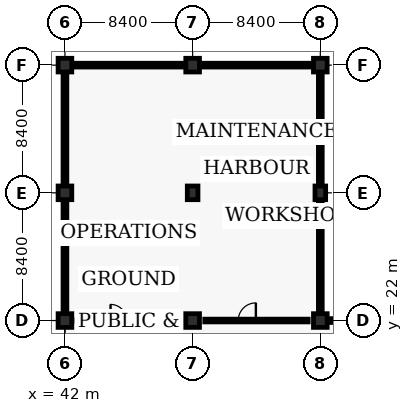
"""IFC4 building model, lengths in metres.
Left out: names, types, materials, properties, quantities, classifications, styles, units other than length and angle.
Written with IfcOpenShell. Run it as: python <this file> out.ifc"""

import sys

from ifc_helpers import new_model, si_unit, direction, frame, frame_2d, origin, origin_2d, place, context, subcontext, project, spatial, rectangle, extrude, element, fill, save


model = new_model("IFC4")
c1 = context("Model", 3, precision=1e-05, world=origin(), true_north=direction((0.0, 1.0)))
c2 = subcontext(c1, "Body", "Model", "MODEL_VIEW")
j1 = project(units=[si_unit("LENGTHUNIT", "METRE"), si_unit("PLANEANGLEUNIT", "RADIAN")], contexts=[c1])
p1 = place(None, origin())
s1 = spatial("IfcSite", under=j1, at=p1, CompositionType="ELEMENT")
p2 = place(p1, origin())
s2 = spatial("IfcBuilding", under=s1, at=p2, CompositionType="ELEMENT")
p3 = place(p2, origin())
s3 = spatial("IfcBuildingStorey", under=s2, at=p3, CompositionType="ELEMENT", Elevation=0.0)
for number, where, z_axis, x_axis in (
    (1, (42.0, 22.0, -0.46), (0.0, 0.0, 1.0), (1.0, 0.0, 0.0)),
    (2, (50.4, 22.0, -0.46), (0.0, 0.0, 1.0), (1.0, 0.0, 0.0)),
    (3, (58.8, 22.0, -0.46), (0.0, 0.0, 1.0), (1.0, 0.0, 0.0)),
    (4, (42.0, 30.4, -0.46), (0.0, 0.0, 1.0), (1.0, 0.0, 0.0)),
    (5, (42.0, 38.8, -0.46), (0.0, 0.0, 1.0), (1.0, 0.0, 0.0)),
):
    element("IfcColumn", number, at=place(p3, frame(where, z_axis=z_axis, x_axis=x_axis)), inside=s3, PredefinedType="COLUMN", context=c2, shape_type="SweptSolid", body=[
        extrude(rectangle(XDim=0.9, YDim=0.9, at=origin_2d()), origin(), (0.0, 0.0, 1.0), 5.9),
    ])
p4 = place(p3, frame((50.4, 30.4, -0.46), z_axis=(0.0, 0.0, 1.0), x_axis=(1.0, 0.0, 0.0)))
e6 = element("IfcColumn", 6, at=p4, inside=s3, PredefinedType="COLUMN", context=c2, shape_type="SweptSolid", body=[
    extrude(rectangle(XDim=0.7, YDim=0.9, at=origin_2d()), origin(), (0.0, 0.0, 1.0), 5.9),
])
p5 = place(p3, frame((50.4, 38.8, -0.46), z_axis=(0.0, 0.0, 1.0), x_axis=(1.0, 0.0, 0.0)))
e7 = element("IfcColumn", 7, at=p5, inside=s3, PredefinedType="COLUMN", context=c2, shape_type="SweptSolid", body=[
    extrude(rectangle(XDim=0.9, YDim=0.9, at=origin_2d()), origin(), (0.0, 0.0, 1.0), 5.9),
])
p6 = place(p3, frame((58.8, 30.4, -0.46), z_axis=(0.0, 0.0, 1.0), x_axis=(1.0, 0.0, 0.0)))
e8 = element("IfcColumn", 8, at=p6, inside=s3, PredefinedType="COLUMN", context=c2, shape_type="SweptSolid", body=[
    extrude(rectangle(XDim=0.7, YDim=0.9, at=origin_2d()), origin(), (0.0, 0.0, 1.0), 5.9),
])
p7 = place(p3, frame((58.8, 38.8, -0.46), z_axis=(0.0, 0.0, 1.0), x_axis=(1.0, 0.0, 0.0)))
e9 = element("IfcColumn", 9, at=p7, inside=s3, PredefinedType="COLUMN", context=c2, shape_type="SweptSolid", body=[
    extrude(rectangle(XDim=0.9, YDim=0.9, at=origin_2d()), origin(), (0.0, 0.0, 1.0), 5.9),
])
p8 = place(p3, frame((66.75, 22.0, 0.0), z_axis=(0.0, 0.0, 1.0), x_axis=(-1.0, 0.0, 0.0)))
e10 = element("IfcWall", 10, at=p8, inside=s3, PredefinedType="SOLIDWALL", context=c2, shape_type="SweptSolid", body=[
    extrude(rectangle(XDim=7.5, YDim=0.25, at=frame_2d((3.75, 0.0))), origin(), (0.0, 0.0, 1.0), 4.625),
])
p9 = place(p8, frame((1.74, 0.0, 0.0)))
e11 = element("IfcOpeningElement", 11, at=p9, cuts=e10, PredefinedType="OPENING", context=c2, shape_type="SweptSolid", body=[
    extrude(rectangle(XDim=1.12, YDim=2.15, at=frame_2d((0.56, 1.075))), frame((0.0, 0.135, 0.0), z_axis=(0.0, -1.0, 0.0), x_axis=(1.0, 0.0, 0.0)), (0.0, 0.0, 1.0), 0.27),
])
p10 = place(p8, frame((3.69, 0.0, 1.0)))
e12 = element("IfcOpeningElement", 12, at=p10, cuts=e10, PredefinedType="OPENING", context=c2, shape_type="SweptSolid", body=[
    extrude(rectangle(XDim=2.4, YDim=1.5, at=frame_2d((1.2, 0.75))), frame((0.0, 0.135, 0.0), z_axis=(0.0, -1.0, 0.0), x_axis=(1.0, 0.0, 0.0)), (0.0, 0.0, 1.0), 0.27),
])
p11 = place(p3, frame((42.0, 29.95, 0.0), z_axis=(0.0, 0.0, 1.0), x_axis=(0.0, -1.0, 0.0)))
e13 = element("IfcWall", 13, at=p11, inside=s3, PredefinedType="SOLIDWALL", context=c2, shape_type="SweptSolid", body=[
    extrude(rectangle(XDim=7.5, YDim=0.25, at=frame_2d((3.75, 0.0))), origin(), (0.0, 0.0, 1.0), 4.625),
])
p12 = place(p11, frame((1.59, 0.0, 0.95)))
e14 = element("IfcOpeningElement", 14, at=p12, cuts=e13, PredefinedType="OPENING", context=c2, shape_type="SweptSolid", body=[
    extrude(rectangle(XDim=1.6, YDim=1.35, at=frame_2d((0.8, 0.675))), frame((0.0, 0.135, 0.0), z_axis=(0.0, -1.0, 0.0), x_axis=(1.0, 0.0, 0.0)), (0.0, 0.0, 1.0), 0.27),
])
p13 = place(p11, frame((4.29, 0.0, 0.95)))
e15 = element("IfcOpeningElement", 15, at=p13, cuts=e13, PredefinedType="OPENING", context=c2, shape_type="SweptSolid", body=[
    extrude(rectangle(XDim=1.3, YDim=1.35, at=frame_2d((0.65, 0.675))), frame((0.0, 0.135, 0.0), z_axis=(0.0, -1.0, 0.0), x_axis=(1.0, 0.0, 0.0)), (0.0, 0.0, 1.0), 0.27),
])
p14 = place(p3, frame((58.8, 22.45, 0.0), z_axis=(0.0, 0.0, 1.0), x_axis=(0.0, 1.0, 0.0)))
e16 = element("IfcWall", 16, at=p14, inside=s3, PredefinedType="SOLIDWALL", context=c2, shape_type="SweptSolid", body=[
    extrude(rectangle(XDim=7.5, YDim=0.25, at=frame_2d((3.75, 0.0))), origin(), (0.0, 0.0, 1.0), 4.625),
])
p15 = place(p14, frame((1.59, 0.0, 0.95)))
e17 = element("IfcOpeningElement", 17, at=p15, cuts=e16, PredefinedType="OPENING", context=c2, shape_type="SweptSolid", body=[
    extrude(rectangle(XDim=1.6, YDim=1.35, at=frame_2d((0.8, 0.675))), frame((0.0, 0.135, 0.0), z_axis=(0.0, -1.0, 0.0), x_axis=(1.0, 0.0, 0.0)), (0.0, 0.0, 1.0), 0.27),
])
p16 = place(p14, frame((4.29, 0.0, 0.95)))
e18 = element("IfcOpeningElement", 18, at=p16, cuts=e16, PredefinedType="OPENING", context=c2, shape_type="SweptSolid", body=[
    extrude(rectangle(XDim=1.3, YDim=1.35, at=frame_2d((0.65, 0.675))), frame((0.0, 0.135, 0.0), z_axis=(0.0, -1.0, 0.0), x_axis=(1.0, 0.0, 0.0)), (0.0, 0.0, 1.0), 0.27),
])
p17 = place(p3, frame((42.0, 38.35, 0.0), z_axis=(0.0, 0.0, 1.0), x_axis=(0.0, -1.0, 0.0)))
e19 = element("IfcWall", 19, at=p17, inside=s3, PredefinedType="SOLIDWALL", context=c2, shape_type="SweptSolid", body=[
    extrude(rectangle(XDim=7.5, YDim=0.25, at=frame_2d((3.75, 0.0))), origin(), (0.0, 0.0, 1.0), 4.625),
])
p18 = place(p17, frame((1.59, 0.0, 0.95)))
e20 = element("IfcOpeningElement", 20, at=p18, cuts=e19, PredefinedType="OPENING", context=c2, shape_type="SweptSolid", body=[
    extrude(rectangle(XDim=1.6, YDim=1.35, at=frame_2d((0.8, 0.675))), frame((0.0, 0.135, 0.0), z_axis=(0.0, -1.0, 0.0), x_axis=(1.0, 0.0, 0.0)), (0.0, 0.0, 1.0), 0.27),
])
p19 = place(p17, frame((4.29, 0.0, 0.95)))
e21 = element("IfcOpeningElement", 21, at=p19, cuts=e19, PredefinedType="OPENING", context=c2, shape_type="SweptSolid", body=[
    extrude(rectangle(XDim=1.3, YDim=1.35, at=frame_2d((0.65, 0.675))), frame((0.0, 0.135, 0.0), z_axis=(0.0, -1.0, 0.0), x_axis=(1.0, 0.0, 0.0)), (0.0, 0.0, 1.0), 0.27),
])
p20 = place(p3, frame((58.8, 30.85, 0.0), z_axis=(0.0, 0.0, 1.0), x_axis=(0.0, 1.0, 0.0)))
e22 = element("IfcWall", 22, at=p20, inside=s3, PredefinedType="SOLIDWALL", context=c2, shape_type="SweptSolid", body=[
    extrude(rectangle(XDim=7.5, YDim=0.25, at=frame_2d((3.75, 0.0))), origin(), (0.0, 0.0, 1.0), 4.625),
])
p21 = place(p20, frame((1.59, 0.0, 0.95)))
e23 = element("IfcOpeningElement", 23, at=p21, cuts=e22, PredefinedType="OPENING", context=c2, shape_type="SweptSolid", body=[
    extrude(rectangle(XDim=1.6, YDim=1.35, at=frame_2d((0.8, 0.675))), frame((0.0, 0.135, 0.0), z_axis=(0.0, -1.0, 0.0), x_axis=(1.0, 0.0, 0.0)), (0.0, 0.0, 1.0), 0.27),
])
p22 = place(p20, frame((4.29, 0.0, 0.95)))
e24 = element("IfcOpeningElement", 24, at=p22, cuts=e22, PredefinedType="OPENING", context=c2, shape_type="SweptSolid", body=[
    extrude(rectangle(XDim=1.3, YDim=1.35, at=frame_2d((0.65, 0.675))), frame((0.0, 0.135, 0.0), z_axis=(0.0, -1.0, 0.0), x_axis=(1.0, 0.0, 0.0)), (0.0, 0.0, 1.0), 0.27),
])
p23 = place(p3, frame((49.95, 38.8, 0.0), z_axis=(0.0, 0.0, 1.0), x_axis=(-1.0, 0.0, 0.0)))
e25 = element("IfcWall", 25, at=p23, inside=s3, PredefinedType="SOLIDWALL", context=c2, shape_type="SweptSolid", body=[
    extrude(rectangle(XDim=7.5, YDim=0.25, at=frame_2d((3.75, 0.0))), origin(), (0.0, 0.0, 1.0), 4.625),
])
p24 = place(p23, frame((1.44, 0.0, 0.95)))
e26 = element("IfcOpeningElement", 26, at=p24, cuts=e25, PredefinedType="OPENING", context=c2, shape_type="SweptSolid", body=[
    extrude(rectangle(XDim=2.4, YDim=1.5, at=frame_2d((1.2, 0.75))), frame((0.0, 0.135, 0.0), z_axis=(0.0, -1.0, 0.0), x_axis=(1.0, 0.0, 0.0)), (0.0, 0.0, 1.0), 0.27),
])
p25 = place(p23, frame((4.24, 0.0, 1.35)))
e27 = element("IfcOpeningElement", 27, at=p25, cuts=e25, PredefinedType="OPENING", context=c2, shape_type="SweptSolid", body=[
    extrude(rectangle(XDim=2.8, YDim=1.05, at=frame_2d((1.4, 0.525))), frame((0.0, 0.135, 0.0), z_axis=(0.0, -1.0, 0.0), x_axis=(1.0, 0.0, 0.0)), (0.0, 0.0, 1.0), 0.27),
])
p26 = place(p3, frame((58.35, 38.8, 0.0), z_axis=(0.0, 0.0, 1.0), x_axis=(-1.0, 0.0, 0.0)))
e28 = element("IfcWall", 28, at=p26, inside=s3, PredefinedType="SOLIDWALL", context=c2, shape_type="SweptSolid", body=[
    extrude(rectangle(XDim=7.5, YDim=0.25, at=frame_2d((3.75, 0.0))), origin(), (0.0, 0.0, 1.0), 4.745),
])
p27 = place(p26, frame((1.44, 0.0, 0.95)))
e29 = element("IfcOpeningElement", 29, at=p27, cuts=e28, PredefinedType="OPENING", context=c2, shape_type="SweptSolid", body=[
    extrude(rectangle(XDim=2.4, YDim=1.5, at=frame_2d((1.2, 0.75))), frame((0.0, 0.135, 0.0), z_axis=(0.0, -1.0, 0.0), x_axis=(1.0, 0.0, 0.0)), (0.0, 0.0, 1.0), 0.27),
])
p28 = place(p26, frame((4.24, 0.0, 1.35)))
e30 = element("IfcOpeningElement", 30, at=p28, cuts=e28, PredefinedType="OPENING", context=c2, shape_type="SweptSolid", body=[
    extrude(rectangle(XDim=2.8, YDim=1.05, at=frame_2d((1.4, 0.525))), frame((0.0, 0.135, 0.0), z_axis=(0.0, -1.0, 0.0), x_axis=(1.0, 0.0, 0.0)), (0.0, 0.0, 1.0), 0.27),
])
p29 = place(p3, frame((42.8, 22.0, 0.0), z_axis=(0.0, 0.0, 1.0), x_axis=(1.0, 0.0, 0.0)))
e31 = element("IfcWall", 31, at=p29, inside=s3, PredefinedType="PARTITIONING", context=c2, shape_type="SweptSolid", body=[
    extrude(rectangle(XDim=6.8, YDim=0.1, at=frame_2d((3.4, 0.0))), origin(), (0.0, 0.0, 1.0), 2.55),
])
p30 = place(p29, frame((2.2, 0.0, 0.0)))
e32 = element("IfcOpeningElement", 32, at=p30, cuts=e31, PredefinedType="OPENING", context=c2, shape_type="SweptSolid", body=[
    extrude(rectangle(XDim=1.06, YDim=2.1, at=frame_2d((0.53, 1.05))), frame((0.0, 0.06, 0.0), z_axis=(0.0, -1.0, 0.0), x_axis=(1.0, 0.0, 0.0)), (0.0, 0.0, 1.0), 0.12),
])
p31 = place(p3, frame((51.2, 22.0, 0.0), z_axis=(0.0, 0.0, 1.0), x_axis=(1.0, 0.0, 0.0)))
e33 = element("IfcWall", 33, at=p31, inside=s3, PredefinedType="SOLIDWALL", context=c2, shape_type="SweptSolid", body=[
    extrude(rectangle(XDim=6.8, YDim=0.18, at=frame_2d((3.4, 0.0))), origin(), (0.0, 0.0, 1.0), 2.55),
])
p32 = place(p31, frame((2.2, 0.0, 0.0)))
e34 = element("IfcOpeningElement", 34, at=p32, cuts=e33, PredefinedType="OPENING", context=c2, shape_type="SweptSolid", body=[
    extrude(rectangle(XDim=1.16, YDim=2.14, at=frame_2d((0.58, 1.07))), frame((0.0, 0.1, 0.0), z_axis=(0.0, -1.0, 0.0), x_axis=(1.0, 0.0, 0.0)), (0.0, 0.0, 1.0), 0.2),
])
p33 = place(p12, origin())
e35 = element("IfcWindow", 35, at=p33, inside=s3, PartitioningType="DOUBLE_PANEL_VERTICAL", PredefinedType="WINDOW", context=c2, shape_type="SweptSolid", body=[
    extrude(rectangle(XDim=1.6, YDim=1.35, at=frame_2d((0.8, 0.675))), frame((0.0, 0.03, 0.0), z_axis=(0.0, -1.0, 0.0), x_axis=(1.0, 0.0, 0.0)), (0.0, 0.0, 1.0), 0.06),
])
fill(e14, e35)
p34 = place(p13, origin())
e36 = element("IfcWindow", 36, at=p34, inside=s3, PartitioningType="SINGLE_PANEL", PredefinedType="WINDOW", context=c2, shape_type="SweptSolid", body=[
    extrude(rectangle(XDim=1.3, YDim=1.35, at=frame_2d((0.65, 0.675))), frame((0.0, 0.03, 0.0), z_axis=(0.0, -1.0, 0.0), x_axis=(1.0, 0.0, 0.0)), (0.0, 0.0, 1.0), 0.06),
])
fill(e15, e36)
p35 = place(p15, origin())
e37 = element("IfcWindow", 37, at=p35, inside=s3, PartitioningType="DOUBLE_PANEL_VERTICAL", PredefinedType="WINDOW", context=c2, shape_type="SweptSolid", body=[
    extrude(rectangle(XDim=1.6, YDim=1.35, at=frame_2d((0.8, 0.675))), frame((0.0, 0.03, 0.0), z_axis=(0.0, -1.0, 0.0), x_axis=(1.0, 0.0, 0.0)), (0.0, 0.0, 1.0), 0.06),
])
fill(e17, e37)
p36 = place(p16, origin())
e38 = element("IfcWindow", 38, at=p36, inside=s3, PartitioningType="SINGLE_PANEL", PredefinedType="WINDOW", context=c2, shape_type="SweptSolid", body=[
    extrude(rectangle(XDim=1.3, YDim=1.35, at=frame_2d((0.65, 0.675))), frame((0.0, 0.03, 0.0), z_axis=(0.0, -1.0, 0.0), x_axis=(1.0, 0.0, 0.0)), (0.0, 0.0, 1.0), 0.06),
])
fill(e18, e38)
p37 = place(p18, origin())
e39 = element("IfcWindow", 39, at=p37, inside=s3, PartitioningType="DOUBLE_PANEL_VERTICAL", PredefinedType="WINDOW", context=c2, shape_type="SweptSolid", body=[
    extrude(rectangle(XDim=1.6, YDim=1.35, at=frame_2d((0.8, 0.675))), frame((0.0, 0.03, 0.0), z_axis=(0.0, -1.0, 0.0), x_axis=(1.0, 0.0, 0.0)), (0.0, 0.0, 1.0), 0.06),
])
fill(e20, e39)
p38 = place(p19, origin())
e40 = element("IfcWindow", 40, at=p38, inside=s3, PartitioningType="SINGLE_PANEL", PredefinedType="WINDOW", context=c2, shape_type="SweptSolid", body=[
    extrude(rectangle(XDim=1.3, YDim=1.35, at=frame_2d((0.65, 0.675))), frame((0.0, 0.03, 0.0), z_axis=(0.0, -1.0, 0.0), x_axis=(1.0, 0.0, 0.0)), (0.0, 0.0, 1.0), 0.06),
])
fill(e21, e40)
p39 = place(p21, origin())
e41 = element("IfcWindow", 41, at=p39, inside=s3, PartitioningType="DOUBLE_PANEL_VERTICAL", PredefinedType="WINDOW", context=c2, shape_type="SweptSolid", body=[
    extrude(rectangle(XDim=1.6, YDim=1.35, at=frame_2d((0.8, 0.675))), frame((0.0, 0.03, 0.0), z_axis=(0.0, -1.0, 0.0), x_axis=(1.0, 0.0, 0.0)), (0.0, 0.0, 1.0), 0.06),
])
fill(e23, e41)
p40 = place(p22, origin())
e42 = element("IfcWindow", 42, at=p40, inside=s3, PartitioningType="SINGLE_PANEL", PredefinedType="WINDOW", context=c2, shape_type="SweptSolid", body=[
    extrude(rectangle(XDim=1.3, YDim=1.35, at=frame_2d((0.65, 0.675))), frame((0.0, 0.03, 0.0), z_axis=(0.0, -1.0, 0.0), x_axis=(1.0, 0.0, 0.0)), (0.0, 0.0, 1.0), 0.06),
])
fill(e24, e42)
p41 = place(p24, origin())
e43 = element("IfcWindow", 43, at=p41, inside=s3, PartitioningType="TRIPLE_PANEL_VERTICAL", PredefinedType="WINDOW", context=c2, shape_type="SweptSolid", body=[
    extrude(rectangle(XDim=2.4, YDim=1.5, at=frame_2d((1.2, 0.75))), frame((0.0, 0.03, 0.0), z_axis=(0.0, -1.0, 0.0), x_axis=(1.0, 0.0, 0.0)), (0.0, 0.0, 1.0), 0.06),
])
fill(e26, e43)
p42 = place(p25, origin())
e44 = element("IfcWindow", 44, at=p42, inside=s3, PartitioningType="TRIPLE_PANEL_VERTICAL", PredefinedType="WINDOW", context=c2, shape_type="SweptSolid", body=[
    extrude(rectangle(XDim=2.8, YDim=1.05, at=frame_2d((1.4, 0.525))), frame((0.0, 0.03, 0.0), z_axis=(0.0, -1.0, 0.0), x_axis=(1.0, 0.0, 0.0)), (0.0, 0.0, 1.0), 0.06),
])
fill(e27, e44)
p43 = place(p27, origin())
e45 = element("IfcWindow", 45, at=p43, inside=s3, PartitioningType="TRIPLE_PANEL_VERTICAL", PredefinedType="WINDOW", context=c2, shape_type="SweptSolid", body=[
    extrude(rectangle(XDim=2.4, YDim=1.5, at=frame_2d((1.2, 0.75))), frame((0.0, 0.03, 0.0), z_axis=(0.0, -1.0, 0.0), x_axis=(1.0, 0.0, 0.0)), (0.0, 0.0, 1.0), 0.06),
])
fill(e29, e45)
p44 = place(p28, origin())
e46 = element("IfcWindow", 46, at=p44, inside=s3, PartitioningType="TRIPLE_PANEL_VERTICAL", PredefinedType="WINDOW", context=c2, shape_type="SweptSolid", body=[
    extrude(rectangle(XDim=2.8, YDim=1.05, at=frame_2d((1.4, 0.525))), frame((0.0, 0.03, 0.0), z_axis=(0.0, -1.0, 0.0), x_axis=(1.0, 0.0, 0.0)), (0.0, 0.0, 1.0), 0.06),
])
fill(e30, e46)
p45 = place(p30, origin())
e47 = element("IfcDoor", 47, at=p45, inside=s3, OperationType="SINGLE_SWING_LEFT", PredefinedType="DOOR", context=c2, shape_type="SweptSolid", body=[
    extrude(rectangle(XDim=1.06, YDim=2.1, at=frame_2d((0.53, 1.05))), frame((0.0, 0.025, 0.0), z_axis=(0.0, -1.0, 0.0), x_axis=(1.0, 0.0, 0.0)), (0.0, 0.0, 1.0), 0.05),
])
fill(e32, e47)
p46 = place(p32, origin())
e48 = element("IfcDoor", 48, at=p46, inside=s3, OperationType="SINGLE_SWING_RIGHT", PredefinedType="DOOR", context=c2, shape_type="SweptSolid", body=[
    extrude(rectangle(XDim=1.16, YDim=2.14, at=frame_2d((0.58, 1.07))), frame((0.0, 0.025, 0.0), z_axis=(0.0, -1.0, 0.0), x_axis=(1.0, 0.0, 0.0)), (0.0, 0.0, 1.0), 0.05),
])
fill(e34, e48)
save(model, sys.argv[1])
